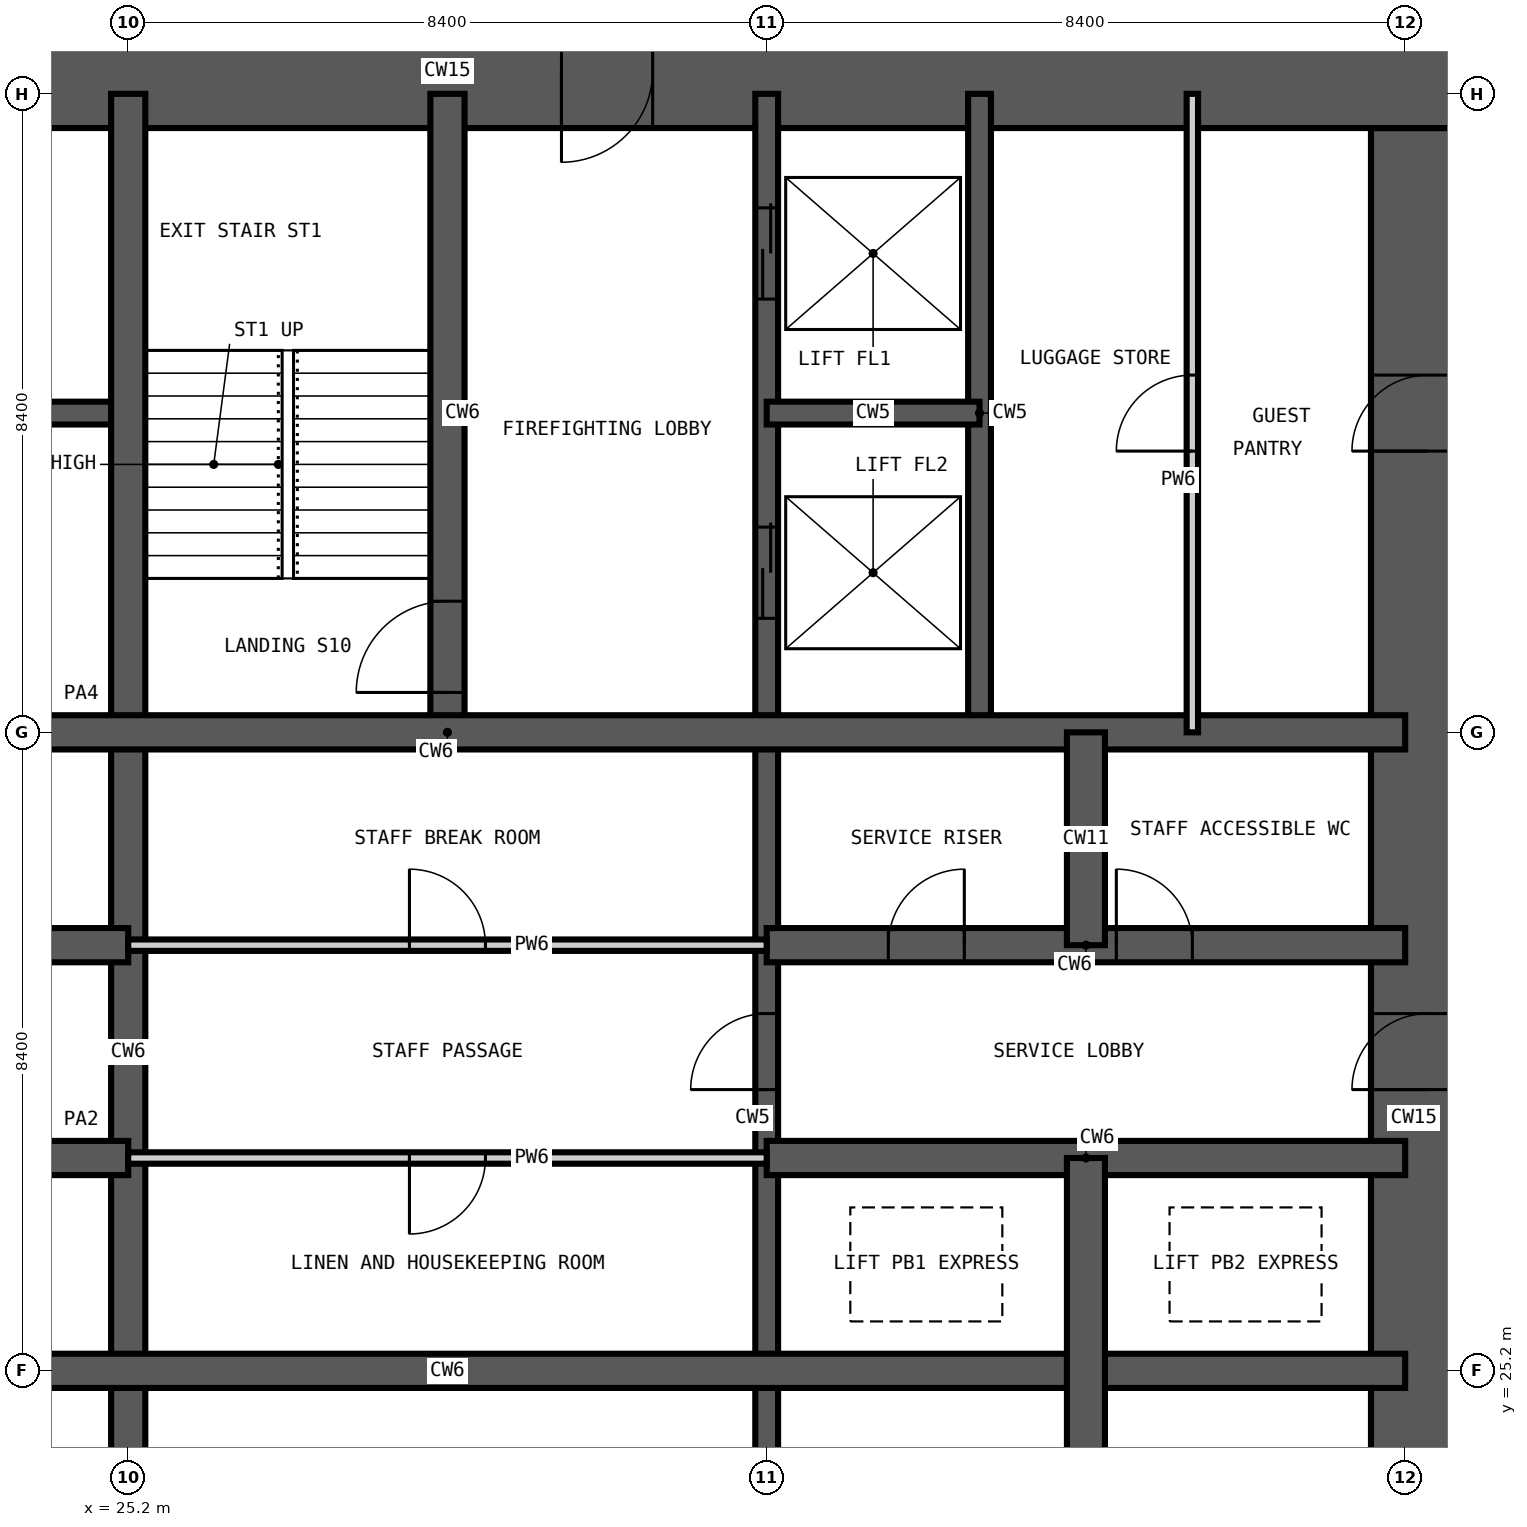
"""IFC4 building model, lengths in metres.
Left out: names, types, materials, properties, quantities, classifications, styles, units other than length and angle.
Written with IfcOpenShell. Run it as: python <this file> out.ifc"""

import sys

from ifc_helpers import new_model, si_unit, direction, frame, frame_2d, origin, place, context, subcontext, project, spatial, rectangle, extrude, element, fill, save


model = new_model("IFC4")
c1 = context("Model", 3, precision=1e-05, world=origin(), true_north=direction((0.0, 1.0)))
c2 = subcontext(c1, "Body", "Model", "MODEL_VIEW")
j1 = project(units=[si_unit("LENGTHUNIT", "METRE"), si_unit("PLANEANGLEUNIT", "RADIAN")], contexts=[c1])
p1 = place(None, origin())
s1 = spatial("IfcSite", under=j1, at=p1, CompositionType="ELEMENT")
p2 = place(p1, origin())
s2 = spatial("IfcBuilding", under=s1, at=p2, CompositionType="ELEMENT")
p3 = place(p2, frame((0.0, 0.0, 55.8)))
s3 = spatial("IfcBuildingStorey", under=s2, at=p3, CompositionType="ELEMENT", Elevation=55.8)
p4 = place(p3, frame((42.3, 17.25, -0.35), z_axis=(0.0, 0.0, 1.0), x_axis=(0.0, 1.0, 0.0)))
e1 = element("IfcWall", 1, at=p4, inside=s3, PredefinedType="SHEAR", context=c2, shape_type="SweptSolid", body=[
    extrude(rectangle(XDim=24.3, YDim=1.5, at=frame_2d((12.15, 0.0))), origin(), (0.0, 0.0, 1.0), 3.6),
])
p5 = place(p4, frame((0.35, 0.0, 0.35)))
e2 = element("IfcOpeningElement", 2, at=p5, cuts=e1, PredefinedType="OPENING", context=c2, shape_type="SweptSolid", body=[
    extrude(rectangle(XDim=1.2, YDim=2.2, at=frame_2d((0.6, 1.1))), frame((0.0, 0.76, 0.0), z_axis=(0.0, -1.0, 0.0), x_axis=(1.0, 0.0, 0.0)), (0.0, 0.0, 1.0), 1.52),
])
p6 = place(p4, frame((11.65, 0.0, 0.35)))
e3 = element("IfcOpeningElement", 3, at=p6, cuts=e1, PredefinedType="OPENING", context=c2, shape_type="SweptSolid", body=[
    extrude(rectangle(XDim=1.0, YDim=2.1, at=frame_2d((0.5, 1.05))), frame((0.0, 0.76, 0.0), z_axis=(0.0, -1.0, 0.0), x_axis=(1.0, 0.0, 0.0)), (0.0, 0.0, 1.0), 1.52),
])
p7 = place(p4, frame((20.05, 0.0, 0.35)))
e4 = element("IfcOpeningElement", 4, at=p7, cuts=e1, PredefinedType="OPENING", context=c2, shape_type="SweptSolid", body=[
    extrude(rectangle(XDim=1.0, YDim=2.1, at=frame_2d((0.5, 1.05))), frame((0.0, 0.76, 0.0), z_axis=(0.0, -1.0, 0.0), x_axis=(1.0, 0.0, 0.0)), (0.0, 0.0, 1.0), 1.52),
])
p8 = place(p3, frame((43.05, 42.3, -0.35), z_axis=(0.0, 0.0, 1.0), x_axis=(-1.0, 0.0, 0.0)))
e5 = element("IfcWall", 5, at=p8, inside=s3, PredefinedType="SHEAR", context=c2, shape_type="SweptSolid", body=[
    extrude(rectangle(XDim=27.3, YDim=1.5, at=frame_2d((13.65, 0.0))), origin(), (0.0, 0.0, 1.0), 3.6),
])
p9 = place(p8, frame((21.55, 0.0, 0.35)))
e6 = element("IfcOpeningElement", 6, at=p9, cuts=e5, PredefinedType="OPENING", context=c2, shape_type="SweptSolid", body=[
    extrude(rectangle(XDim=1.0, YDim=2.1, at=frame_2d((0.5, 1.05))), frame((0.0, 0.76, 0.0), z_axis=(0.0, -1.0, 0.0), x_axis=(1.0, 0.0, 0.0)), (0.0, 0.0, 1.0), 1.52),
])
p10 = place(p8, frame((10.95, 0.0, 0.35)))
e7 = element("IfcOpeningElement", 7, at=p10, cuts=e5, PredefinedType="OPENING", context=c2, shape_type="SweptSolid", body=[
    extrude(rectangle(XDim=1.2, YDim=2.2, at=frame_2d((0.6, 1.1))), frame((0.0, 0.76, 0.0), z_axis=(0.0, -1.0, 0.0), x_axis=(1.0, 0.0, 0.0)), (0.0, 0.0, 1.0), 1.52),
])
p11 = place(p3, frame((33.6, 16.8, -0.35), z_axis=(0.0, 0.0, 1.0), x_axis=(0.0, 1.0, 0.0)))
e8 = element("IfcWall", 8, at=p11, inside=s3, PredefinedType="SHEAR", context=c2, shape_type="SweptSolid", body=[
    extrude(rectangle(XDim=25.2, YDim=0.3, at=frame_2d((12.6, 0.0))), origin(), (0.0, 0.0, 1.0), 3.6),
])
p12 = place(p11, frame((22.5, 0.0, 0.35)))
e9 = element("IfcOpeningElement", 9, at=p12, cuts=e8, PredefinedType="OPENING", context=c2, shape_type="SweptSolid", body=[
    extrude(rectangle(XDim=1.2, YDim=2.2, at=frame_2d((0.6, 1.1))), frame((0.0, 0.16, 0.0), z_axis=(0.0, -1.0, 0.0), x_axis=(1.0, 0.0, 0.0)), (0.0, 0.0, 1.0), 0.32),
])
p13 = place(p11, frame((18.3, 0.0, 0.35)))
e10 = element("IfcOpeningElement", 10, at=p13, cuts=e8, PredefinedType="OPENING", context=c2, shape_type="SweptSolid", body=[
    extrude(rectangle(XDim=1.2, YDim=2.2, at=frame_2d((0.6, 1.1))), frame((0.0, 0.16, 0.0), z_axis=(0.0, -1.0, 0.0), x_axis=(1.0, 0.0, 0.0)), (0.0, 0.0, 1.0), 0.32),
])
p14 = place(p11, frame((12.1, 0.0, 0.35)))
e11 = element("IfcOpeningElement", 11, at=p14, cuts=e8, PredefinedType="OPENING", context=c2, shape_type="SweptSolid", body=[
    extrude(rectangle(XDim=1.0, YDim=2.1, at=frame_2d((0.5, 1.05))), frame((0.0, 0.16, 0.0), z_axis=(0.0, -1.0, 0.0), x_axis=(1.0, 0.0, 0.0)), (0.0, 0.0, 1.0), 0.32),
])
for number, where, z_axis, x_axis in (
    (12, (36.4, 33.6, -0.35), (0.0, 0.0, 1.0), (0.0, 1.0, 0.0)),
    (13, (16.8, 37.8, -0.35), (0.0, 0.0, 1.0), (1.0, 0.0, 0.0)),
):
    element("IfcWall", number, at=place(p3, frame(where, z_axis=z_axis, x_axis=x_axis)), inside=s3, PredefinedType="SHEAR", context=c2, shape_type="SweptSolid", body=[
        extrude(rectangle(XDim=8.4, YDim=0.3, at=frame_2d((4.2, 0.0))), origin(), (0.0, 0.0, 1.0), 3.6),
    ])
p15 = place(p3, frame((33.6, 37.8, -0.35), z_axis=(0.0, 0.0, 1.0), x_axis=(1.0, 0.0, 0.0)))
e14 = element("IfcWall", 14, at=p15, inside=s3, PredefinedType="SHEAR", context=c2, shape_type="SweptSolid", body=[
    extrude(rectangle(XDim=2.8, YDim=0.3, at=frame_2d((1.4, 0.0))), origin(), (0.0, 0.0, 1.0), 3.6),
])
p16 = place(p3, frame((25.2, 16.8, -0.35), z_axis=(0.0, 0.0, 1.0), x_axis=(0.0, 1.0, 0.0)))
e15 = element("IfcWall", 15, at=p16, inside=s3, PredefinedType="SHEAR", context=c2, shape_type="SweptSolid", body=[
    extrude(rectangle(XDim=25.2, YDim=0.45, at=frame_2d((12.6, 0.0))), origin(), (0.0, 0.0, 1.0), 3.6),
])
p17 = place(p3, frame((29.4, 33.6, -0.35), z_axis=(0.0, 0.0, 1.0), x_axis=(0.0, 1.0, 0.0)))
e16 = element("IfcWall", 16, at=p17, inside=s3, PredefinedType="SHEAR", context=c2, shape_type="SweptSolid", body=[
    extrude(rectangle(XDim=8.4, YDim=0.45, at=frame_2d((4.2, 0.0))), origin(), (0.0, 0.0, 1.0), 3.6),
])
p18 = place(p17, frame((0.525, 0.0, 0.35)))
e17 = element("IfcOpeningElement", 17, at=p18, cuts=e16, PredefinedType="OPENING", context=c2, shape_type="SweptSolid", body=[
    extrude(rectangle(XDim=1.2, YDim=2.2, at=frame_2d((0.6, 1.1))), frame((0.0, 0.235, 0.0), z_axis=(0.0, -1.0, 0.0), x_axis=(1.0, 0.0, 0.0)), (0.0, 0.0, 1.0), 0.47),
])
p19 = place(p3, frame((16.8, 25.2, -0.35), z_axis=(0.0, 0.0, 1.0), x_axis=(1.0, 0.0, 0.0)))
e18 = element("IfcWall", 18, at=p19, inside=s3, PredefinedType="SHEAR", context=c2, shape_type="SweptSolid", body=[
    extrude(rectangle(XDim=25.2, YDim=0.45, at=frame_2d((12.6, 0.0))), origin(), (0.0, 0.0, 1.0), 3.6),
])
p20 = place(p3, frame((16.8, 28.0, -0.35), z_axis=(0.0, 0.0, 1.0), x_axis=(1.0, 0.0, 0.0)))
e19 = element("IfcWall", 19, at=p20, inside=s3, PredefinedType="SHEAR", context=c2, shape_type="SweptSolid", body=[
    extrude(rectangle(XDim=8.4, YDim=0.45, at=frame_2d((4.2, 0.0))), origin(), (0.0, 0.0, 1.0), 3.6),
])
p21 = place(p20, frame((1.55, 0.0, 0.35)))
e20 = element("IfcOpeningElement", 20, at=p21, cuts=e19, PredefinedType="OPENING", context=c2, shape_type="SweptSolid", body=[
    extrude(rectangle(XDim=1.1, YDim=2.2, at=frame_2d((0.55, 1.1))), frame((0.0, 0.235, 0.0), z_axis=(0.0, -1.0, 0.0), x_axis=(1.0, 0.0, 0.0)), (0.0, 0.0, 1.0), 0.47),
])
p22 = place(p20, frame((5.75, 0.0, 0.35)))
e21 = element("IfcOpeningElement", 21, at=p22, cuts=e19, PredefinedType="OPENING", context=c2, shape_type="SweptSolid", body=[
    extrude(rectangle(XDim=1.1, YDim=2.2, at=frame_2d((0.55, 1.1))), frame((0.0, 0.235, 0.0), z_axis=(0.0, -1.0, 0.0), x_axis=(1.0, 0.0, 0.0)), (0.0, 0.0, 1.0), 0.47),
])
p23 = place(p3, frame((33.6, 28.0, -0.35), z_axis=(0.0, 0.0, 1.0), x_axis=(1.0, 0.0, 0.0)))
e22 = element("IfcWall", 22, at=p23, inside=s3, PredefinedType="SHEAR", context=c2, shape_type="SweptSolid", body=[
    extrude(rectangle(XDim=8.4, YDim=0.45, at=frame_2d((4.2, 0.0))), origin(), (0.0, 0.0, 1.0), 3.6),
])
p24 = place(p3, frame((16.8, 30.8, -0.35), z_axis=(0.0, 0.0, 1.0), x_axis=(1.0, 0.0, 0.0)))
e23 = element("IfcWall", 23, at=p24, inside=s3, PredefinedType="SHEAR", context=c2, shape_type="SweptSolid", body=[
    extrude(rectangle(XDim=8.4, YDim=0.45, at=frame_2d((4.2, 0.0))), origin(), (0.0, 0.0, 1.0), 3.6),
])
p25 = place(p24, frame((1.55, 0.0, 0.35)))
e24 = element("IfcOpeningElement", 24, at=p25, cuts=e23, PredefinedType="OPENING", context=c2, shape_type="SweptSolid", body=[
    extrude(rectangle(XDim=1.1, YDim=2.2, at=frame_2d((0.55, 1.1))), frame((0.0, 0.235, 0.0), z_axis=(0.0, -1.0, 0.0), x_axis=(1.0, 0.0, 0.0)), (0.0, 0.0, 1.0), 0.47),
])
p26 = place(p24, frame((5.75, 0.0, 0.35)))
e25 = element("IfcOpeningElement", 25, at=p26, cuts=e23, PredefinedType="OPENING", context=c2, shape_type="SweptSolid", body=[
    extrude(rectangle(XDim=1.1, YDim=2.2, at=frame_2d((0.55, 1.1))), frame((0.0, 0.235, 0.0), z_axis=(0.0, -1.0, 0.0), x_axis=(1.0, 0.0, 0.0)), (0.0, 0.0, 1.0), 0.47),
])
p27 = place(p3, frame((33.6, 30.8, -0.35), z_axis=(0.0, 0.0, 1.0), x_axis=(1.0, 0.0, 0.0)))
e26 = element("IfcWall", 26, at=p27, inside=s3, PredefinedType="SHEAR", context=c2, shape_type="SweptSolid", body=[
    extrude(rectangle(XDim=8.4, YDim=0.45, at=frame_2d((4.2, 0.0))), origin(), (0.0, 0.0, 1.0), 3.6),
])
p28 = place(p27, frame((1.6, 0.0, 0.35)))
e27 = element("IfcOpeningElement", 27, at=p28, cuts=e26, PredefinedType="OPENING", context=c2, shape_type="SweptSolid", body=[
    extrude(rectangle(XDim=1.0, YDim=2.1, at=frame_2d((0.5, 1.05))), frame((0.0, 0.235, 0.0), z_axis=(0.0, -1.0, 0.0), x_axis=(1.0, 0.0, 0.0)), (0.0, 0.0, 1.0), 0.47),
])
p29 = place(p27, frame((4.6, 0.0, 0.35)))
e28 = element("IfcOpeningElement", 28, at=p29, cuts=e26, PredefinedType="OPENING", context=c2, shape_type="SweptSolid", body=[
    extrude(rectangle(XDim=1.0, YDim=2.1, at=frame_2d((0.5, 1.05))), frame((0.0, 0.235, 0.0), z_axis=(0.0, -1.0, 0.0), x_axis=(1.0, 0.0, 0.0)), (0.0, 0.0, 1.0), 0.47),
])
p30 = place(p3, frame((16.8, 33.6, -0.35), z_axis=(0.0, 0.0, 1.0), x_axis=(1.0, 0.0, 0.0)))
e29 = element("IfcWall", 29, at=p30, inside=s3, PredefinedType="SHEAR", context=c2, shape_type="SweptSolid", body=[
    extrude(rectangle(XDim=25.2, YDim=0.45, at=frame_2d((12.6, 0.0))), origin(), (0.0, 0.0, 1.0), 3.6),
])
p31 = place(p3, frame((37.8, 16.8, -0.35), z_axis=(0.0, 0.0, 1.0), x_axis=(0.0, 1.0, 0.0)))
e30 = element("IfcWall", 30, at=p31, inside=s3, PredefinedType="SHEAR", context=c2, shape_type="SweptSolid", body=[
    extrude(rectangle(XDim=11.2, YDim=0.5, at=frame_2d((5.6, 0.0))), origin(), (0.0, 0.0, 1.0), 3.6),
])
p32 = place(p3, frame((37.8, 30.8, -0.35), z_axis=(0.0, 0.0, 1.0), x_axis=(0.0, 1.0, 0.0)))
e31 = element("IfcWall", 31, at=p32, inside=s3, PredefinedType="SHEAR", context=c2, shape_type="SweptSolid", body=[
    extrude(rectangle(XDim=2.8, YDim=0.5, at=frame_2d((1.4, 0.0))), origin(), (0.0, 0.0, 1.0), 3.6),
])
p33 = place(p3, frame((39.2, 33.6, 0.0), z_axis=(0.0, 0.0, 1.0), x_axis=(0.0, 1.0, 0.0)))
e32 = element("IfcWall", 32, at=p33, inside=s3, PredefinedType="PARTITIONING", context=c2, shape_type="SweptSolid", body=[
    extrude(rectangle(XDim=8.4, YDim=0.15, at=frame_2d((4.2, 0.0))), origin(), (0.0, 0.0, 1.0), 3.25),
])
p34 = place(p33, frame((3.7, 0.0, 0.0)))
e33 = element("IfcOpeningElement", 33, at=p34, cuts=e32, PredefinedType="OPENING", context=c2, shape_type="SweptSolid", body=[
    extrude(rectangle(XDim=1.0, YDim=2.1, at=frame_2d((0.5, 1.05))), frame((0.0, 0.085, 0.0), z_axis=(0.0, -1.0, 0.0), x_axis=(1.0, 0.0, 0.0)), (0.0, 0.0, 1.0), 0.17),
])
p35 = place(p3, frame((25.2, 28.0, 0.0), z_axis=(0.0, 0.0, 1.0), x_axis=(1.0, 0.0, 0.0)))
e34 = element("IfcWall", 34, at=p35, inside=s3, PredefinedType="PARTITIONING", context=c2, shape_type="SweptSolid", body=[
    extrude(rectangle(XDim=8.4, YDim=0.15, at=frame_2d((4.2, 0.0))), origin(), (0.0, 0.0, 1.0), 3.25),
])
p36 = place(p35, frame((3.7, 0.0, 0.0)))
e35 = element("IfcOpeningElement", 35, at=p36, cuts=e34, PredefinedType="OPENING", context=c2, shape_type="SweptSolid", body=[
    extrude(rectangle(XDim=1.0, YDim=2.1, at=frame_2d((0.5, 1.05))), frame((0.0, 0.085, 0.0), z_axis=(0.0, -1.0, 0.0), x_axis=(1.0, 0.0, 0.0)), (0.0, 0.0, 1.0), 0.17),
])
p37 = place(p3, frame((25.2, 30.8, 0.0), z_axis=(0.0, 0.0, 1.0), x_axis=(1.0, 0.0, 0.0)))
e36 = element("IfcWall", 36, at=p37, inside=s3, PredefinedType="PARTITIONING", context=c2, shape_type="SweptSolid", body=[
    extrude(rectangle(XDim=8.4, YDim=0.15, at=frame_2d((4.2, 0.0))), origin(), (0.0, 0.0, 1.0), 3.25),
])
p38 = place(p37, frame((3.7, 0.0, 0.0)))
e37 = element("IfcOpeningElement", 37, at=p38, cuts=e36, PredefinedType="OPENING", context=c2, shape_type="SweptSolid", body=[
    extrude(rectangle(XDim=1.0, YDim=2.1, at=frame_2d((0.5, 1.05))), frame((0.0, 0.085, 0.0), z_axis=(0.0, -1.0, 0.0), x_axis=(1.0, 0.0, 0.0)), (0.0, 0.0, 1.0), 0.17),
])
p39 = place(p18, origin())
e38 = element("IfcDoor", 38, at=p39, inside=s3, OperationType="SINGLE_SWING_LEFT", PredefinedType="DOOR", context=c2, shape_type="SweptSolid", body=[
    extrude(rectangle(XDim=1.2, YDim=2.2, at=frame_2d((0.6, 1.1))), frame((0.0, 0.025, 0.0), z_axis=(0.0, -1.0, 0.0), x_axis=(1.0, 0.0, 0.0)), (0.0, 0.0, 1.0), 0.05),
])
fill(e17, e38)
p40 = place(p12, origin())
e39 = element("IfcDoor", 39, at=p40, inside=s3, OperationType="DOUBLE_DOOR_SLIDING", PredefinedType="DOOR", context=c2, shape_type="SweptSolid", body=[
    extrude(rectangle(XDim=1.2, YDim=2.2, at=frame_2d((0.6, 1.1))), frame((0.0, 0.025, 0.0), z_axis=(0.0, -1.0, 0.0), x_axis=(1.0, 0.0, 0.0)), (0.0, 0.0, 1.0), 0.05),
])
fill(e9, e39)
p41 = place(p13, origin())
e40 = element("IfcDoor", 40, at=p41, inside=s3, OperationType="DOUBLE_DOOR_SLIDING", PredefinedType="DOOR", context=c2, shape_type="SweptSolid", body=[
    extrude(rectangle(XDim=1.2, YDim=2.2, at=frame_2d((0.6, 1.1))), frame((0.0, 0.025, 0.0), z_axis=(0.0, -1.0, 0.0), x_axis=(1.0, 0.0, 0.0)), (0.0, 0.0, 1.0), 0.05),
])
fill(e10, e40)
p42 = place(p14, origin())
e41 = element("IfcDoor", 41, at=p42, inside=s3, OperationType="SINGLE_SWING_LEFT", PredefinedType="DOOR", context=c2, shape_type="SweptSolid", body=[
    extrude(rectangle(XDim=1.0, YDim=2.1, at=frame_2d((0.5, 1.05))), frame((0.0, 0.025, 0.0), z_axis=(0.0, -1.0, 0.0), x_axis=(1.0, 0.0, 0.0)), (0.0, 0.0, 1.0), 0.05),
])
fill(e11, e41)
p43 = place(p36, frame((1.0, 0.0, 0.0), z_axis=(0.0, 0.0, 1.0), x_axis=(-1.0, 0.0, 0.0)))
e42 = element("IfcDoor", 42, at=p43, inside=s3, OperationType="SINGLE_SWING_RIGHT", PredefinedType="DOOR", context=c2, shape_type="SweptSolid", body=[
    extrude(rectangle(XDim=1.0, YDim=2.1, at=frame_2d((0.5, 1.05))), frame((0.0, 0.025, 0.0), z_axis=(0.0, -1.0, 0.0), x_axis=(1.0, 0.0, 0.0)), (0.0, 0.0, 1.0), 0.05),
])
fill(e35, e42)
p44 = place(p38, origin())
e43 = element("IfcDoor", 43, at=p44, inside=s3, OperationType="SINGLE_SWING_LEFT", PredefinedType="DOOR", context=c2, shape_type="SweptSolid", body=[
    extrude(rectangle(XDim=1.0, YDim=2.1, at=frame_2d((0.5, 1.05))), frame((0.0, 0.025, 0.0), z_axis=(0.0, -1.0, 0.0), x_axis=(1.0, 0.0, 0.0)), (0.0, 0.0, 1.0), 0.05),
])
fill(e37, e43)
p45 = place(p28, origin())
e44 = element("IfcDoor", 44, at=p45, inside=s3, OperationType="SINGLE_SWING_RIGHT", PredefinedType="DOOR", context=c2, shape_type="SweptSolid", body=[
    extrude(rectangle(XDim=1.0, YDim=2.1, at=frame_2d((0.5, 1.05))), frame((0.0, 0.025, 0.0), z_axis=(0.0, -1.0, 0.0), x_axis=(1.0, 0.0, 0.0)), (0.0, 0.0, 1.0), 0.05),
])
fill(e27, e44)
p46 = place(p29, origin())
e45 = element("IfcDoor", 45, at=p46, inside=s3, OperationType="SINGLE_SWING_LEFT", PredefinedType="DOOR", context=c2, shape_type="SweptSolid", body=[
    extrude(rectangle(XDim=1.0, YDim=2.1, at=frame_2d((0.5, 1.05))), frame((0.0, 0.025, 0.0), z_axis=(0.0, -1.0, 0.0), x_axis=(1.0, 0.0, 0.0)), (0.0, 0.0, 1.0), 0.05),
])
fill(e28, e45)
p47 = place(p6, origin())
e46 = element("IfcDoor", 46, at=p47, inside=s3, OperationType="SINGLE_SWING_LEFT", PredefinedType="DOOR", context=c2, shape_type="SweptSolid", body=[
    extrude(rectangle(XDim=1.0, YDim=2.1, at=frame_2d((0.5, 1.05))), frame((0.0, 0.025, 0.0), z_axis=(0.0, -1.0, 0.0), x_axis=(1.0, 0.0, 0.0)), (0.0, 0.0, 1.0), 0.05),
])
fill(e3, e46)
p48 = place(p10, origin())
e47 = element("IfcDoor", 47, at=p48, inside=s3, OperationType="SINGLE_SWING_RIGHT", PredefinedType="DOOR", context=c2, shape_type="SweptSolid", body=[
    extrude(rectangle(XDim=1.2, YDim=2.2, at=frame_2d((0.6, 1.1))), frame((0.0, 0.025, 0.0), z_axis=(0.0, -1.0, 0.0), x_axis=(1.0, 0.0, 0.0)), (0.0, 0.0, 1.0), 0.05),
])
fill(e7, e47)
p49 = place(p7, origin())
e48 = element("IfcDoor", 48, at=p49, inside=s3, OperationType="SINGLE_SWING_LEFT", PredefinedType="DOOR", context=c2, shape_type="SweptSolid", body=[
    extrude(rectangle(XDim=1.0, YDim=2.1, at=frame_2d((0.5, 1.05))), frame((0.0, 0.025, 0.0), z_axis=(0.0, -1.0, 0.0), x_axis=(1.0, 0.0, 0.0)), (0.0, 0.0, 1.0), 0.05),
])
fill(e4, e48)
p50 = place(p34, origin())
e49 = element("IfcDoor", 49, at=p50, inside=s3, OperationType="SINGLE_SWING_LEFT", PredefinedType="DOOR", context=c2, shape_type="SweptSolid", body=[
    extrude(rectangle(XDim=1.0, YDim=2.1, at=frame_2d((0.5, 1.05))), frame((0.0, 0.025, 0.0), z_axis=(0.0, -1.0, 0.0), x_axis=(1.0, 0.0, 0.0)), (0.0, 0.0, 1.0), 0.05),
])
fill(e33, e49)
save(model, sys.argv[1])
